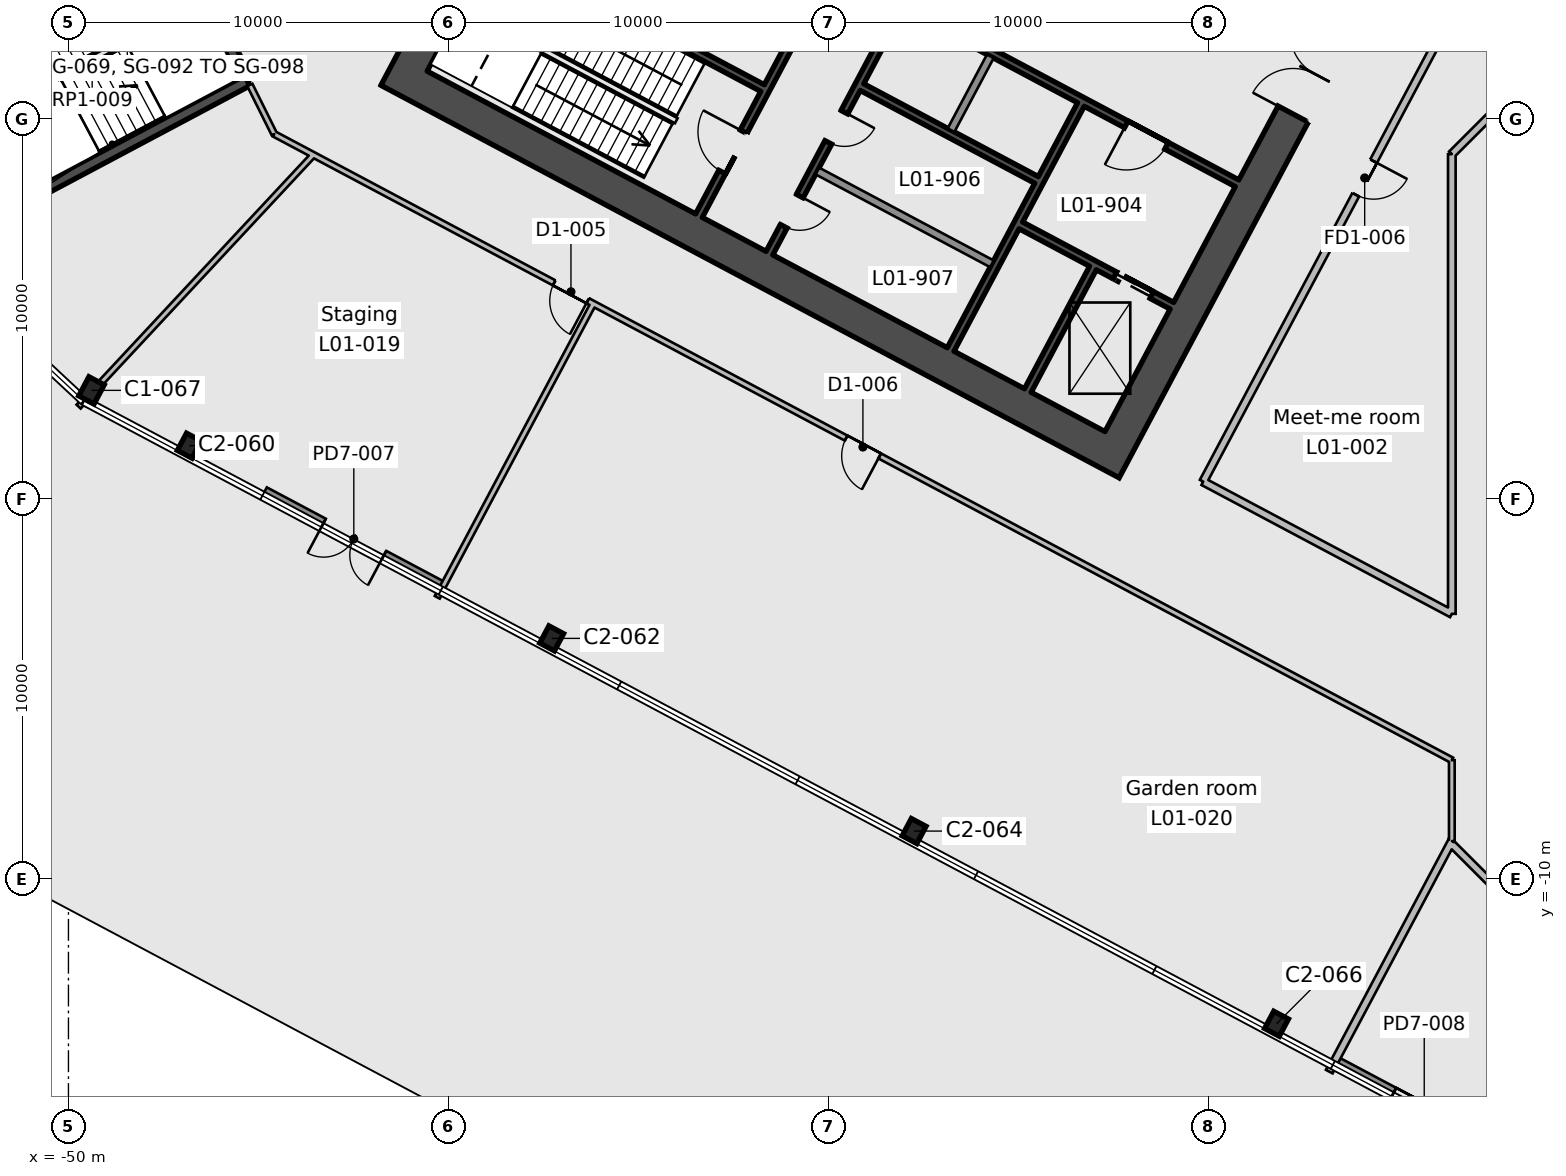
"""IFC4 building model, lengths in metres.
Left out: names, types, materials, properties, quantities, classifications, styles, units other than length and angle.
Written with IfcOpenShell. Run it as: python <this file> out.ifc"""

import sys

from ifc_helpers import new_model, si_unit, direction, frame, frame_2d, origin, origin_2d, place, context, subcontext, project, spatial, rectangle, i_section, extrude, element, fill, save


model = new_model("IFC4")
c1 = context("Model", 3, precision=1e-05, world=origin(), true_north=direction((0.0, 1.0)))
c2 = subcontext(c1, "Body", "Model", "MODEL_VIEW")
j1 = project(units=[si_unit("LENGTHUNIT", "METRE"), si_unit("PLANEANGLEUNIT", "RADIAN")], contexts=[c1])
p1 = place(None, origin())
s1 = spatial("IfcSite", under=j1, at=p1, CompositionType="ELEMENT")
p2 = place(p1, origin())
s2 = spatial("IfcBuilding", under=s1, at=p2, CompositionType="ELEMENT")
p3 = place(p2, frame((0.0, 0.0, 7.0)))
s3 = spatial("IfcBuildingStorey", under=s2, at=p3, CompositionType="ELEMENT", Elevation=7.0)
for number, where, z_axis, x_axis in (
    (1, (-18.213, -13.805, 0.0), (0.0, 0.0, 1.0), (0.883, -0.469, 0.0)),
    (2, (-27.749, -8.735, 0.0), (0.0, 0.0, 1.0), (0.883, -0.469, 0.0)),
    (3, (-37.285, -3.665, 0.0), (0.0, 0.0, 1.0), (0.883, -0.469, 0.0)),
    (4, (-46.821, 1.405, 0.0), (0.0, 0.0, 1.0), (0.883, -0.469, 0.0)),
):
    element("IfcColumn", number, at=place(p3, frame(where, z_axis=z_axis, x_axis=x_axis)), inside=s3, PredefinedType="COLUMN", context=c2, shape_type="SweptSolid", body=[
        extrude(i_section(OverallWidth=0.437, OverallDepth=0.513, WebThickness=0.061, FlangeThickness=0.097, FilletRadius=0.015, at=origin_2d()), origin(), (0.0, 0.0, 1.0), 5.2),
    ])
p4 = place(p3, frame((-49.394, 2.861, 0.0), z_axis=(0.0, 0.0, 1.0), x_axis=(0.882947592859, -0.469471562786, 0.0)))
e5 = element("IfcColumn", 5, at=p4, inside=s3, PredefinedType="COLUMN", context=c2, shape_type="SweptSolid", body=[
    extrude(i_section(OverallWidth=0.455, OverallDepth=0.569, WebThickness=0.078, FlangeThickness=0.125, FilletRadius=0.015, at=origin_2d()), origin(), (0.0, 0.0, 1.0), 5.2),
])
p5 = place(p3, frame((-13.362, 18.43, 0.0), z_axis=(0.0, 0.0, 1.0), x_axis=(-0.46947084998, -0.882947971864, 0.0)))
e6 = element("IfcWall", 6, at=p5, inside=s3, PredefinedType="SHEAR", context=c2, shape_type="SweptSolid", body=[
    extrude(rectangle(XDim=20.0, YDim=0.9, at=frame_2d((10.0, 0.0))), origin(), (0.0, 0.0, 1.0), 5.2),
])
p6 = place(p5, frame((7.0, 0.0, 0.0)))
e7 = element("IfcOpeningElement", 7, at=p6, cuts=e6, PredefinedType="OPENING", context=c2, shape_type="SweptSolid", body=[
    extrude(rectangle(XDim=2.4, YDim=2.4, at=frame_2d((1.2, 1.2))), frame((0.0, 0.46, 0.0), z_axis=(0.0, -1.0, 0.0), x_axis=(1.0, 0.0, 0.0)), (0.0, 0.0, 1.0), 0.92),
])
p7 = place(p3, frame((-31.992, 28.336, 0.0), z_axis=(0.0, 0.0, 1.0), x_axis=(-0.46947084998, -0.882947971864, 0.0)))
e8 = element("IfcWall", 8, at=p7, inside=s3, PredefinedType="SHEAR", context=c2, shape_type="SweptSolid", body=[
    extrude(rectangle(XDim=20.0, YDim=0.9, at=frame_2d((10.0, 0.0))), origin(), (0.0, 0.0, 1.0), 5.2),
])
p8 = place(p7, frame((10.6, 0.0, 0.0)))
e9 = element("IfcOpeningElement", 9, at=p8, cuts=e8, PredefinedType="OPENING", context=c2, shape_type="SweptSolid", body=[
    extrude(rectangle(XDim=2.4, YDim=2.4, at=frame_2d((1.2, 1.2))), frame((0.0, 0.46, 0.0), z_axis=(0.0, -1.0, 0.0), x_axis=(1.0, 0.0, 0.0)), (0.0, 0.0, 1.0), 0.92),
])
p9 = place(p3, frame((-22.937, 1.38, 0.0), z_axis=(0.0, 0.0, 1.0), x_axis=(-0.88295276571, 0.46946183394, 0.0)))
e10 = element("IfcWall", 10, at=p9, inside=s3, PredefinedType="SHEAR", context=c2, shape_type="SweptSolid", body=[
    extrude(rectangle(XDim=20.2, YDim=0.9, at=frame_2d((10.1, 0.0))), origin(), (0.0, 0.0, 1.0), 5.2),
])
p10 = place(p3, frame((-23.043, 6.08, 0.0), z_axis=(0.0, 0.0, 1.0), x_axis=(-0.469494272526, -0.882935517501, 0.0)))
e11 = element("IfcWall", 11, at=p10, inside=s3, PredefinedType="SHEAR", context=c2, shape_type="SweptSolid", body=[
    extrude(rectangle(XDim=3.65, YDim=0.2, at=frame_2d((1.825, 0.0))), origin(), (0.0, 0.0, 1.0), 5.2),
])
p11 = place(p3, frame((-23.36, 10.382, 0.0), z_axis=(0.0, 0.0, 1.0), x_axis=(-0.469480409012, -0.88294288918, 0.0)))
e12 = element("IfcWall", 12, at=p11, inside=s3, PredefinedType="SHEAR", context=c2, shape_type="SweptSolid", body=[
    extrude(rectangle(XDim=7.3, YDim=0.2, at=frame_2d((3.65, 0.0))), origin(), (0.0, 0.0, 1.0), 5.2),
])
p12 = place(p3, frame((-25.744, 11.65, 0.0), z_axis=(0.0, 0.0, 1.0), x_axis=(-0.469487830541, -0.882938942948, 0.0)))
e13 = element("IfcWall", 13, at=p12, inside=s3, PredefinedType="SOLIDWALL", context=c2, shape_type="SweptSolid", body=[
    extrude(rectangle(XDim=2.2, YDim=0.2, at=frame_2d((1.1, 0.0))), origin(), (0.0, 0.0, 1.0), 5.2),
])
p13 = place(p3, frame((-28.128, 12.917, 0.0), z_axis=(0.0, 0.0, 1.0), x_axis=(-0.469454336211, -0.882956752176, 0.0)))
e14 = element("IfcWall", 14, at=p13, inside=s3, PredefinedType="SHEAR", context=c2, shape_type="SweptSolid", body=[
    extrude(rectangle(XDim=7.3, YDim=0.2, at=frame_2d((3.65, 0.0))), origin(), (0.0, 0.0, 1.0), 5.2),
])
p14 = place(p13, frame((3.1, 0.0, 0.0)))
e15 = element("IfcOpeningElement", 15, at=p14, cuts=e14, PredefinedType="OPENING", context=c2, shape_type="SweptSolid", body=[
    extrude(rectangle(XDim=0.9, YDim=2.1, at=frame_2d((0.45, 1.05))), frame((0.0, 0.11, 0.0), z_axis=(0.0, -1.0, 0.0), x_axis=(1.0, 0.0, 0.0)), (0.0, 0.0, 1.0), 0.22),
])
p15 = place(p13, frame((5.6, 0.0, 0.0)))
e16 = element("IfcOpeningElement", 16, at=p15, cuts=e14, PredefinedType="OPENING", context=c2, shape_type="SweptSolid", body=[
    extrude(rectangle(XDim=0.9, YDim=2.1, at=frame_2d((0.45, 1.05))), frame((0.0, 0.11, 0.0), z_axis=(0.0, -1.0, 0.0), x_axis=(1.0, 0.0, 0.0)), (0.0, 0.0, 1.0), 0.22),
])
p16 = place(p3, frame((-29.982, 13.903, 0.0), z_axis=(0.0, 0.0, 1.0), x_axis=(-0.469454336211, -0.882956752176, 0.0)))
e17 = element("IfcWall", 17, at=p16, inside=s3, PredefinedType="SHEAR", context=c2, shape_type="SweptSolid", body=[
    extrude(rectangle(XDim=7.3, YDim=0.2, at=frame_2d((3.65, 0.0))), origin(), (0.0, 0.0, 1.0), 5.2),
])
p17 = place(p16, frame((4.8, 0.0, 0.0)))
e18 = element("IfcOpeningElement", 18, at=p17, cuts=e17, PredefinedType="OPENING", context=c2, shape_type="SweptSolid", body=[
    extrude(rectangle(XDim=1.2, YDim=2.1, at=frame_2d((0.6, 1.05))), frame((0.0, 0.11, 0.0), z_axis=(0.0, -1.0, 0.0), x_axis=(1.0, 0.0, 0.0)), (0.0, 0.0, 1.0), 0.22),
])
p18 = place(p3, frame((-19.252, 8.311, 0.0), z_axis=(0.0, 0.0, 1.0), x_axis=(-0.882955722218, 0.469456273365, 0.0)))
e19 = element("IfcWall", 19, at=p18, inside=s3, PredefinedType="SHEAR", context=c2, shape_type="SweptSolid", body=[
    extrude(rectangle(XDim=10.0, YDim=0.2, at=frame_2d((5.0, 0.0))), origin(), (0.0, 0.0, 1.0), 5.2),
])
p19 = place(p18, frame((2.1, 0.0, 0.0)))
e20 = element("IfcOpeningElement", 20, at=p19, cuts=e19, PredefinedType="OPENING", context=c2, shape_type="SweptSolid", body=[
    extrude(rectangle(XDim=1.2, YDim=2.1, at=frame_2d((0.6, 1.05))), frame((0.0, 0.11, 0.0), z_axis=(0.0, -1.0, 0.0), x_axis=(1.0, 0.0, 0.0)), (0.0, 0.0, 1.0), 0.22),
])
p20 = place(p3, frame((-24.528, 8.398, 0.0), z_axis=(0.0, 0.0, 1.0), x_axis=(-0.882953967957, 0.469459572775, 0.0)))
e21 = element("IfcWall", 21, at=p20, inside=s3, PredefinedType="SHEAR", context=c2, shape_type="SweptSolid", body=[
    extrude(rectangle(XDim=5.2, YDim=0.2, at=frame_2d((2.6, 0.0))), origin(), (0.0, 0.0, 1.0), 5.2),
])
p21 = place(p3, frame((-20.965, 5.088, 0.0), z_axis=(0.0, 0.0, 1.0), x_axis=(-0.882925986334, 0.469512196493, 0.0)))
e22 = element("IfcWall", 22, at=p21, inside=s3, PredefinedType="SHEAR", context=c2, shape_type="SweptSolid", body=[
    extrude(rectangle(XDim=4.5, YDim=0.2, at=frame_2d((2.25, 0.0))), origin(), (0.0, 0.0, 1.0), 5.2),
])
p22 = place(p21, frame((0.6, 0.0, 0.0)))
e23 = element("IfcOpeningElement", 23, at=p22, cuts=e22, PredefinedType="OPENING", context=c2, shape_type="SweptSolid", body=[
    extrude(rectangle(XDim=1.1, YDim=2.1, at=frame_2d((0.55, 1.05))), frame((0.0, 0.11, 0.0), z_axis=(0.0, -1.0, 0.0), x_axis=(1.0, 0.0, 0.0)), (0.0, 0.0, 1.0), 0.22),
])
p23 = place(p3, frame((-31.737, 10.816, 0.0), z_axis=(0.0, 0.0, 1.0), x_axis=(-0.882940221191, 0.469485426614, 0.0)))
e24 = element("IfcWall", 24, at=p23, inside=s3, PredefinedType="SHEAR", context=c2, shape_type="SweptSolid", body=[
    extrude(rectangle(XDim=8.0, YDim=0.2, at=frame_2d((4.0, 0.0))), origin(), (0.0, 0.0, 1.0), 5.2),
])
p24 = place(p3, frame((-25.702, 6.191, 0.0), z_axis=(0.0, 0.0, 1.0), x_axis=(-0.882934506056, 0.469496174655, 0.0)))
e25 = element("IfcWall", 25, at=p24, inside=s3, PredefinedType="SOLIDWALL", context=c2, shape_type="SweptSolid", body=[
    extrude(rectangle(XDim=5.2, YDim=0.2, at=frame_2d((2.6, 0.0))), origin(), (0.0, 0.0, 1.0), 5.2),
])
p25 = place(p3, frame((-47.574, 15.29, 0.0), z_axis=(0.0, 0.0, 1.0), x_axis=(0.469443498566, -0.882962514297, 0.0)))
e26 = element("IfcWall", 26, at=p25, inside=s3, PredefinedType="SHEAR", context=c2, shape_type="SweptSolid", body=[
    extrude(rectangle(XDim=4.85, YDim=0.3, at=frame_2d((2.425, 0.0))), origin(), (0.0, 0.0, 1.0), 5.2),
])
p26 = place(p3, frame((-45.297, 11.007, 0.0), z_axis=(0.0, 0.0, 1.0), x_axis=(-0.882951519127, -0.469464178475, 0.0)))
e27 = element("IfcWall", 27, at=p26, inside=s3, PredefinedType="SHEAR", context=c2, shape_type="SweptSolid", body=[
    extrude(rectangle(XDim=8.3, YDim=0.3, at=frame_2d((4.15, 0.0))), origin(), (0.0, 0.0, 1.0), 5.2),
])
p27 = place(p3, frame((-54.903, 11.393, 0.0), z_axis=(0.0, 0.0, 1.0), x_axis=(0.882939326045, 0.469487110071, 0.0)))
e28 = element("IfcWall", 28, at=p27, inside=s3, PredefinedType="SHEAR", context=c2, shape_type="SweptSolid", body=[
    extrude(rectangle(XDim=8.3, YDim=0.3, at=frame_2d((4.15, 0.0))), origin(), (0.0, 0.0, 1.0), 5.2),
])
p28 = place(p27, frame((6.05, 0.0, 0.0)))
e29 = element("IfcOpeningElement", 29, at=p28, cuts=e28, PredefinedType="OPENING", context=c2, shape_type="SweptSolid", body=[
    extrude(rectangle(XDim=1.9, YDim=2.1, at=frame_2d((0.95, 1.05))), frame((0.0, 0.16, 0.0), z_axis=(0.0, -1.0, 0.0), x_axis=(1.0, 0.0, 0.0)), (0.0, 0.0, 1.0), 0.32),
])
p29 = place(p3, frame((-44.839, 0.199, 0.0), z_axis=(0.0, 0.0, 1.0), x_axis=(0.882942052833, -0.46948198191, 0.0)))
e30 = element("IfcWall", 30, at=p29, inside=s3, PredefinedType="STANDARD", context=c2, shape_type="SweptSolid", body=[
    extrude(rectangle(XDim=5.317, YDim=0.25, at=frame_2d((2.658, 0.0))), origin(), (0.0, 0.0, 1.0), 3.612),
])
p30 = place(p29, frame((1.758, 0.0, 0.0)))
e31 = element("IfcOpeningElement", 31, at=p30, cuts=e30, PredefinedType="OPENING", context=c2, shape_type="SweptSolid", body=[
    extrude(rectangle(XDim=1.8, YDim=2.4, at=frame_2d((0.9, 1.2))), frame((0.0, 0.135, 0.0), z_axis=(0.0, -1.0, 0.0), x_axis=(1.0, 0.0, 0.0)), (0.0, 0.0, 1.0), 0.27),
])
p31 = place(p3, frame((-16.673, -14.777, 0.0), z_axis=(0.0, 0.0, 1.0), x_axis=(0.882942052833, -0.46948198191, 0.0)))
e32 = element("IfcWall", 32, at=p31, inside=s3, PredefinedType="STANDARD", context=c2, shape_type="SweptSolid", body=[
    extrude(rectangle(XDim=5.317, YDim=0.25, at=frame_2d((2.658, 0.0))), origin(), (0.0, 0.0, 1.0), 3.612),
])
p32 = place(p31, frame((1.758, 0.0, 0.0)))
e33 = element("IfcOpeningElement", 33, at=p32, cuts=e32, PredefinedType="OPENING", context=c2, shape_type="SweptSolid", body=[
    extrude(rectangle(XDim=1.8, YDim=2.4, at=frame_2d((0.9, 1.2))), frame((0.0, 0.135, 0.0), z_axis=(0.0, -1.0, 0.0), x_axis=(1.0, 0.0, 0.0)), (0.0, 0.0, 1.0), 0.27),
])
p33 = place(p3, frame((-49.733, 2.433, 0.0), z_axis=(0.0, 0.0, 1.0), x_axis=(0.682002261255, 0.731350063679, 0.0)))
e34 = element("IfcWall", 34, at=p33, inside=s3, PredefinedType="PARTITIONING", context=c2, shape_type="SweptSolid", body=[
    extrude(rectangle(XDim=9.059, YDim=0.15, at=frame_2d((4.529, 0.0))), origin(), (0.0, 0.0, 1.0), 4.75),
])
p34 = place(p3, frame((-36.189, 5.142, 0.0), z_axis=(0.0, 0.0, 1.0), x_axis=(-0.469482945701, -0.882941540361, 0.0)))
e35 = element("IfcWall", 35, at=p34, inside=s3, PredefinedType="PARTITIONING", context=c2, shape_type="SweptSolid", body=[
    extrude(rectangle(XDim=8.75, YDim=0.15, at=frame_2d((4.375, 0.0))), origin(), (0.0, 0.0, 1.0), 4.75),
])
p35 = place(p3, frame((-13.6, -8.998, 0.0), z_axis=(0.0, 0.0, 1.0), x_axis=(0.0, 1.0, 0.0)))
e36 = element("IfcWall", 36, at=p35, inside=s3, PredefinedType="PARTITIONING", context=c2, shape_type="SweptSolid", body=[
    extrude(rectangle(XDim=2.129, YDim=0.15, at=frame_2d((1.064, 0.0))), origin(), (0.0, 0.0, 1.0), 4.75),
])
p36 = place(p3, frame((-13.6, -6.869, 0.0), z_axis=(0.0, 0.0, 1.0), x_axis=(-0.88295406426, 0.469459391648, 0.0)))
e37 = element("IfcWall", 37, at=p36, inside=s3, PredefinedType="PARTITIONING", context=c2, shape_type="SweptSolid", body=[
    extrude(rectangle(XDim=35.091, YDim=0.15, at=frame_2d((17.545, 0.0))), origin(), (0.0, 0.0, 1.0), 4.75),
])
p37 = place(p36, frame((25.75, 0.0, 0.0)))
e38 = element("IfcOpeningElement", 38, at=p37, cuts=e37, PredefinedType="OPENING", context=c2, shape_type="SweptSolid", body=[
    extrude(rectangle(XDim=1.0, YDim=2.1, at=frame_2d((0.5, 1.05))), frame((0.0, 0.085, 0.0), z_axis=(0.0, -1.0, 0.0), x_axis=(1.0, 0.0, 0.0)), (0.0, 0.0, 1.0), 0.17),
])
p38 = place(p36, frame((17.05, 0.0, 0.0)))
e39 = element("IfcOpeningElement", 39, at=p38, cuts=e37, PredefinedType="OPENING", context=c2, shape_type="SweptSolid", body=[
    extrude(rectangle(XDim=1.0, YDim=2.1, at=frame_2d((0.5, 1.05))), frame((0.0, 0.085, 0.0), z_axis=(0.0, -1.0, 0.0), x_axis=(1.0, 0.0, 0.0)), (0.0, 0.0, 1.0), 0.17),
])
p39 = place(p3, frame((-44.584, 9.605, 0.0), z_axis=(0.0, 0.0, 1.0), x_axis=(-0.445453249083, 0.895305200968, 0.0)))
e40 = element("IfcWall", 40, at=p39, inside=s3, PredefinedType="PARTITIONING", context=c2, shape_type="SweptSolid", body=[
    extrude(rectangle(XDim=1.443, YDim=0.15, at=frame_2d((0.722, 0.0))), origin(), (0.0, 0.0, 1.0), 4.75),
])
p40 = place(p3, frame((-13.6, -8.998, 0.0), z_axis=(0.0, 0.0, 1.0), x_axis=(-0.469531053644, -0.882915958438, 0.0)))
e41 = element("IfcWall", 41, at=p40, inside=s3, PredefinedType="PARTITIONING", context=c2, shape_type="SweptSolid", body=[
    extrude(rectangle(XDim=6.87, YDim=0.2, at=frame_2d((3.435, 0.0))), origin(), (0.0, 0.0, 1.0), 4.75),
])
p41 = place(p3, frame((-20.142, 0.46, 0.0), z_axis=(0.0, 0.0, 1.0), x_axis=(0.469506937019, 0.882928783136, 0.0)))
e42 = element("IfcWall", 42, at=p41, inside=s3, PredefinedType="PARTITIONING", context=c2, shape_type="SweptSolid", body=[
    extrude(rectangle(XDim=18.1, YDim=0.2, at=frame_2d((9.05, 0.0))), origin(), (0.0, 0.0, 1.0), 4.75),
])
p42 = place(p41, frame((8.55, 0.0, 0.0)))
e43 = element("IfcOpeningElement", 43, at=p42, cuts=e42, PredefinedType="OPENING", context=c2, shape_type="SweptSolid", body=[
    extrude(rectangle(XDim=1.0, YDim=2.1, at=frame_2d((0.5, 1.05))), frame((0.0, 0.11, 0.0), z_axis=(0.0, -1.0, 0.0), x_axis=(1.0, 0.0, 0.0)), (0.0, 0.0, 1.0), 0.22),
])
p43 = place(p3, frame((-13.6, -3.019, 0.0), z_axis=(0.0, 0.0, 1.0), x_axis=(-0.882915984826, 0.469531004022, 0.0)))
e44 = element("IfcWall", 44, at=p43, inside=s3, PredefinedType="PARTITIONING", context=c2, shape_type="SweptSolid", body=[
    extrude(rectangle(XDim=7.409, YDim=0.2, at=frame_2d((3.705, 0.0))), origin(), (0.0, 0.0, 1.0), 4.75),
])
p44 = place(p3, frame((-13.6, 9.077, 0.0), z_axis=(0.0, 0.0, 1.0), x_axis=(0.0, -1.0, 0.0)))
e45 = element("IfcWall", 45, at=p44, inside=s3, PredefinedType="PARTITIONING", context=c2, shape_type="SweptSolid", body=[
    extrude(rectangle(XDim=12.096, YDim=0.2, at=frame_2d((6.048, 0.0))), origin(), (0.0, 0.0, 1.0), 4.75),
])
for number, where, z_axis, x_axis in (
    (46, (-13.6, 9.077, 0.0), (0.0, 0.0, 1.0), (0.707, 0.707, 0.0)),
    (47, (-9.077, -13.6, 0.0), (0.0, 0.0, 1.0), (-0.707, 0.707, 0.0)),
):
    element("IfcWall", number, at=place(p3, frame(where, z_axis=z_axis, x_axis=x_axis)), inside=s3, PredefinedType="PARTITIONING", context=c2, shape_type="SweptSolid", body=[
        extrude(rectangle(XDim=6.397, YDim=0.2, at=frame_2d((3.198, 0.0))), origin(), (0.0, 0.0, 1.0), 4.75),
    ])
p45 = place(p6, frame((2.4, 0.0, 0.0), z_axis=(0.0, 0.0, 1.0), x_axis=(-1.0, 0.0, 0.0)))
e48 = element("IfcDoor", 48, at=p45, inside=s3, OperationType="DOUBLE_DOOR_SINGLE_SWING", PredefinedType="DOOR", context=c2, shape_type="SweptSolid", body=[
    extrude(rectangle(XDim=2.4, YDim=2.4, at=frame_2d((1.2, 1.2))), frame((0.0, 0.025, 0.0), z_axis=(0.0, -1.0, 0.0), x_axis=(1.0, 0.0, 0.0)), (0.0, 0.0, 1.0), 0.05),
])
fill(e7, e48)
p46 = place(p19, origin())
e49 = element("IfcDoor", 49, at=p46, inside=s3, OperationType="SINGLE_SWING_RIGHT", PredefinedType="DOOR", context=c2, shape_type="SweptSolid", body=[
    extrude(rectangle(XDim=1.2, YDim=2.1, at=frame_2d((0.6, 1.05))), frame((0.0, 0.025, 0.0), z_axis=(0.0, -1.0, 0.0), x_axis=(1.0, 0.0, 0.0)), (0.0, 0.0, 1.0), 0.05),
])
fill(e20, e49)
p47 = place(p17, frame((1.2, 0.0, 0.0), z_axis=(0.0, 0.0, 1.0), x_axis=(-1.0, 0.0, 0.0)))
e50 = element("IfcDoor", 50, at=p47, inside=s3, OperationType="SINGLE_SWING_RIGHT", PredefinedType="DOOR", context=c2, shape_type="SweptSolid", body=[
    extrude(rectangle(XDim=1.2, YDim=2.1, at=frame_2d((0.6, 1.05))), frame((0.0, 0.025, 0.0), z_axis=(0.0, -1.0, 0.0), x_axis=(1.0, 0.0, 0.0)), (0.0, 0.0, 1.0), 0.05),
])
fill(e18, e50)
p48 = place(p22, origin())
e51 = element("IfcDoor", 51, at=p48, inside=s3, OperationType="DOUBLE_DOOR_SLIDING", PredefinedType="DOOR", context=c2, shape_type="SweptSolid", body=[
    extrude(rectangle(XDim=1.1, YDim=2.1, at=frame_2d((0.55, 1.05))), frame((0.0, 0.025, 0.0), z_axis=(0.0, -1.0, 0.0), x_axis=(1.0, 0.0, 0.0)), (0.0, 0.0, 1.0), 0.05),
])
fill(e23, e51)
p49 = place(p14, origin())
e52 = element("IfcDoor", 52, at=p49, inside=s3, OperationType="SINGLE_SWING_LEFT", PredefinedType="DOOR", context=c2, shape_type="SweptSolid", body=[
    extrude(rectangle(XDim=0.9, YDim=2.1, at=frame_2d((0.45, 1.05))), frame((0.0, 0.025, 0.0), z_axis=(0.0, -1.0, 0.0), x_axis=(1.0, 0.0, 0.0)), (0.0, 0.0, 1.0), 0.05),
])
fill(e15, e52)
p50 = place(p15, origin())
e53 = element("IfcDoor", 53, at=p50, inside=s3, OperationType="SINGLE_SWING_LEFT", PredefinedType="DOOR", context=c2, shape_type="SweptSolid", body=[
    extrude(rectangle(XDim=0.9, YDim=2.1, at=frame_2d((0.45, 1.05))), frame((0.0, 0.025, 0.0), z_axis=(0.0, -1.0, 0.0), x_axis=(1.0, 0.0, 0.0)), (0.0, 0.0, 1.0), 0.05),
])
fill(e16, e53)
p51 = place(p30, frame((1.8, 0.0, 0.0), z_axis=(0.0, 0.0, 1.0), x_axis=(-1.0, 0.0, 0.0)))
e54 = element("IfcDoor", 54, at=p51, inside=s3, OperationType="DOUBLE_DOOR_SINGLE_SWING", PredefinedType="DOOR", context=c2, shape_type="SweptSolid", body=[
    extrude(rectangle(XDim=1.8, YDim=2.4, at=frame_2d((0.9, 1.2))), frame((0.0, 0.025, 0.0), z_axis=(0.0, -1.0, 0.0), x_axis=(1.0, 0.0, 0.0)), (0.0, 0.0, 1.0), 0.05),
])
fill(e31, e54)
p52 = place(p32, frame((1.8, 0.0, 0.0), z_axis=(0.0, 0.0, 1.0), x_axis=(-1.0, 0.0, 0.0)))
e55 = element("IfcDoor", 55, at=p52, inside=s3, OperationType="DOUBLE_DOOR_SINGLE_SWING", PredefinedType="DOOR", context=c2, shape_type="SweptSolid", body=[
    extrude(rectangle(XDim=1.8, YDim=2.4, at=frame_2d((0.9, 1.2))), frame((0.0, 0.025, 0.0), z_axis=(0.0, -1.0, 0.0), x_axis=(1.0, 0.0, 0.0)), (0.0, 0.0, 1.0), 0.05),
])
fill(e33, e55)
p53 = place(p42, frame((1.0, 0.0, 0.0), z_axis=(0.0, 0.0, 1.0), x_axis=(-1.0, 0.0, 0.0)))
e56 = element("IfcDoor", 56, at=p53, inside=s3, OperationType="SINGLE_SWING_LEFT", PredefinedType="DOOR", context=c2, shape_type="SweptSolid", body=[
    extrude(rectangle(XDim=1.0, YDim=2.1, at=frame_2d((0.5, 1.05))), frame((0.0, 0.025, 0.0), z_axis=(0.0, -1.0, 0.0), x_axis=(1.0, 0.0, 0.0)), (0.0, 0.0, 1.0), 0.05),
])
fill(e43, e56)
p54 = place(p37, origin())
e57 = element("IfcDoor", 57, at=p54, inside=s3, OperationType="SINGLE_SWING_LEFT", PredefinedType="DOOR", context=c2, shape_type="SweptSolid", body=[
    extrude(rectangle(XDim=1.0, YDim=2.1, at=frame_2d((0.5, 1.05))), frame((0.0, 0.025, 0.0), z_axis=(0.0, -1.0, 0.0), x_axis=(1.0, 0.0, 0.0)), (0.0, 0.0, 1.0), 0.05),
])
fill(e38, e57)
p55 = place(p38, origin())
e58 = element("IfcDoor", 58, at=p55, inside=s3, OperationType="SINGLE_SWING_LEFT", PredefinedType="DOOR", context=c2, shape_type="SweptSolid", body=[
    extrude(rectangle(XDim=1.0, YDim=2.1, at=frame_2d((0.5, 1.05))), frame((0.0, 0.025, 0.0), z_axis=(0.0, -1.0, 0.0), x_axis=(1.0, 0.0, 0.0)), (0.0, 0.0, 1.0), 0.05),
])
fill(e39, e58)
save(model, sys.argv[1])
